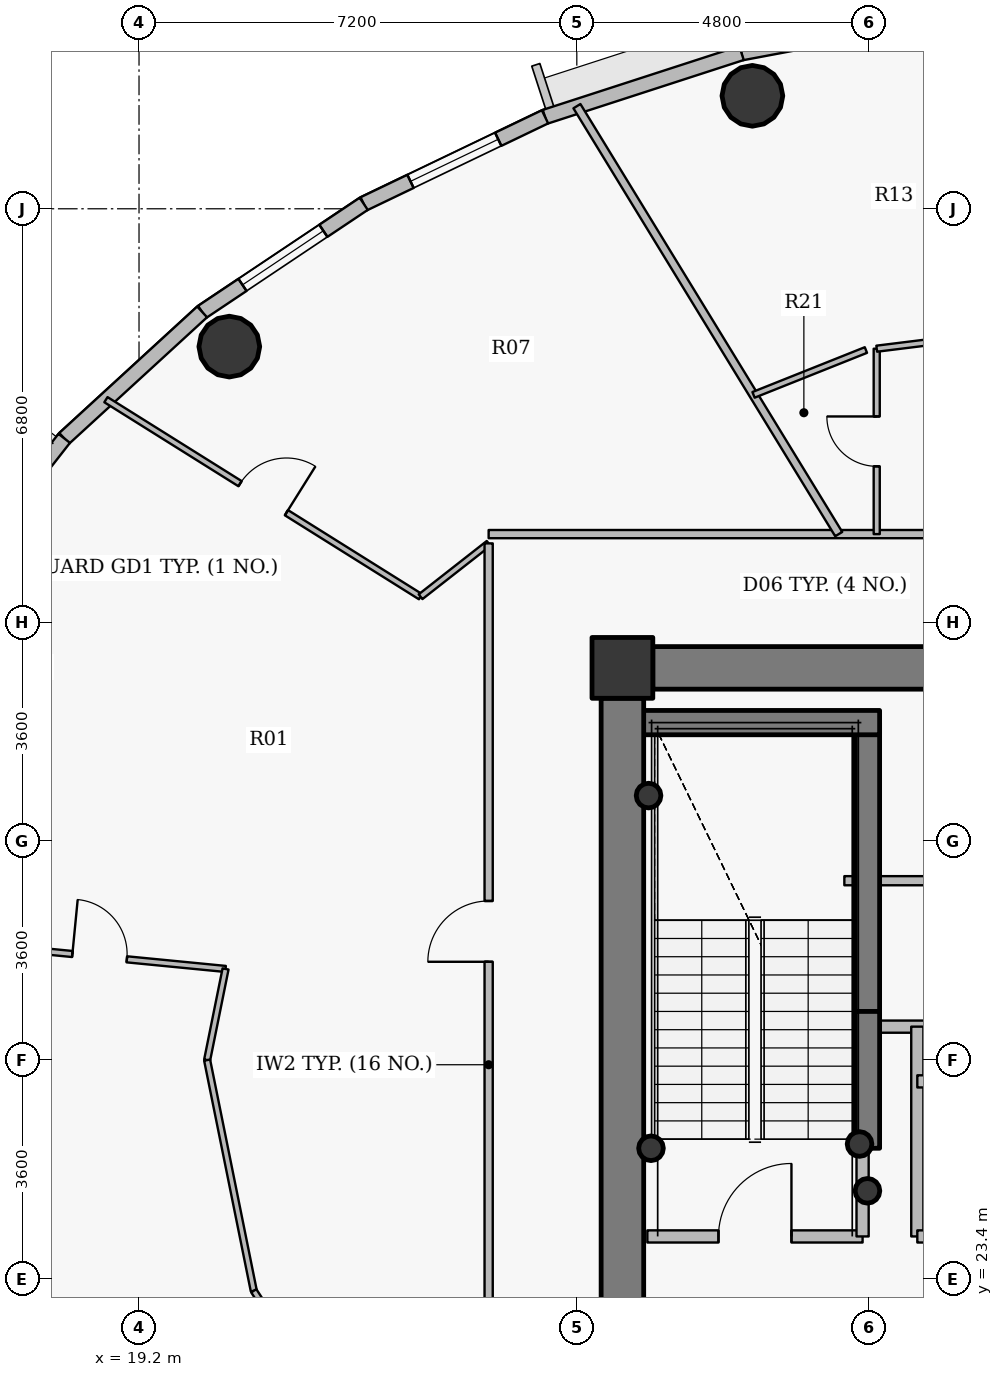
"""IFC4 building model, lengths in metres.
Left out: names, types, materials, properties, quantities, classifications, styles, units other than length and angle.
Written with IfcOpenShell. Run it as: python <this file> out.ifc"""

import sys

from ifc_helpers import new_model, si_unit, direction, frame, frame_2d, origin, origin_2d, place, context, subcontext, project, spatial, rectangle, hollow_circle, extrude, source, transform, mapped, element, fill, save


model = new_model("IFC4")
c1 = context("Model", 3, precision=1e-05, world=origin(), true_north=direction((0.0, 1.0)))
c2 = subcontext(c1, "Body", "Model", "MODEL_VIEW")
j1 = project(units=[si_unit("LENGTHUNIT", "METRE"), si_unit("PLANEANGLEUNIT", "RADIAN")], contexts=[c1])
p1 = place(None, origin())
s1 = spatial("IfcSite", under=j1, at=p1, CompositionType="ELEMENT")
p2 = place(p1, origin())
s2 = spatial("IfcBuilding", under=s1, at=p2, CompositionType="ELEMENT")
p3 = place(p2, frame((0.0, 0.0, 284.25)))
s3 = spatial("IfcBuildingStorey", under=s2, at=p3, CompositionType="ELEMENT", Elevation=284.25)
p4 = place(p3, frame((27.15, 33.45, 0.0), z_axis=(0.0, 0.0, 1.0), x_axis=(1.0, 0.0, 0.0)))
e1 = element("IfcColumn", 1, at=p4, inside=s3, PredefinedType="COLUMN", context=c2, shape_type="SweptSolid", body=[
    extrude(rectangle(XDim=1.0, YDim=1.0, at=origin_2d()), origin(), (0.0, 0.0, 1.0), 3.75),
])
p5 = place(p3, frame((31.18, 27.8, 0.0), z_axis=(0.0, 0.0, 1.0), x_axis=(0.0, 1.0, 0.0)))
e2 = element("IfcWall", 2, at=p5, inside=s3, PredefinedType="SHEAR", context=c2, shape_type="SweptSolid", body=[
    extrude(rectangle(XDim=4.75, YDim=0.4, at=frame_2d((2.375, 0.0))), origin(), (0.0, 0.0, 1.0), 3.75),
])
p6 = place(p3, frame((27.25, 32.55, 0.0), z_axis=(0.0, 0.0, 1.0), x_axis=(1.0, 0.0, 0.0)))
e3 = element("IfcWall", 3, at=p6, inside=s3, PredefinedType="SHEAR", context=c2, shape_type="SweptSolid", body=[
    extrude(rectangle(XDim=4.13, YDim=0.4, at=frame_2d((2.065, 0.0))), origin(), (0.0, 0.0, 1.0), 3.75),
])
for number, where, z_axis, x_axis in (
    (4, (27.58, 31.35, 0.0), (0.0, 0.0, 1.0), (1.0, 0.0, 0.0)),
    (5, (31.05, 25.62, 0.0), (0.0, 0.0, 1.0), (1.0, 0.0, 0.0)),
    (6, (31.18, 24.85, 0.0), (0.0, 0.0, 1.0), (1.0, 0.0, 0.0)),
    (7, (27.62, 25.55, 0.0), (0.0, 0.0, 1.0), (1.0, 0.0, 0.0)),
):
    element("IfcColumn", number, at=place(p3, frame(where, z_axis=z_axis, x_axis=x_axis)), inside=s3, PredefinedType="COLUMN", context=c2, shape_type="SweptSolid", body=[
        extrude(hollow_circle(Radius=0.203, WallThickness=0.016, at=origin_2d()), origin(), (0.0, 0.0, 1.0), 3.75),
    ])
p7 = place(p3, frame((27.65, 33.45, 0.0), z_axis=(0.0, 0.0, 1.0), x_axis=(1.0, 0.0, 0.0)))
e8 = element("IfcWall", 8, at=p7, inside=s3, PredefinedType="SHEAR", context=c2, shape_type="SweptSolid", body=[
    extrude(rectangle(XDim=16.7, YDim=0.7, at=frame_2d((8.35, 0.0))), origin(), (0.0, 0.0, 1.0), 3.05),
])
p8 = place(p7, frame((12.775, 0.0, 0.0)))
e9 = element("IfcOpeningElement", 9, at=p8, cuts=e8, PredefinedType="OPENING", context=c2, shape_type="SweptSolid", body=[
    extrude(rectangle(XDim=1.15, YDim=2.15, at=origin_2d()), frame((0.575, 0.36, 1.075), z_axis=(0.0, -1.0, 0.0), x_axis=(1.0, 0.0, 0.0)), (0.0, 0.0, 1.0), 0.72),
])
p9 = place(p3, frame((27.15, 21.05, 0.0), z_axis=(0.0, 0.0, 1.0), x_axis=(0.0, 1.0, 0.0)))
e10 = element("IfcWall", 10, at=p9, inside=s3, PredefinedType="SHEAR", context=c2, shape_type="SweptSolid", body=[
    extrude(rectangle(XDim=11.9, YDim=0.7, at=frame_2d((5.95, 0.0))), origin(), (0.0, 0.0, 1.0), 3.05),
])
p10 = place(p3, frame((31.18, 25.55, 0.0), z_axis=(0.0, 0.0, 1.0), x_axis=(0.0, 1.0, 0.0)))
e11 = element("IfcWall", 11, at=p10, inside=s3, PredefinedType="SHEAR", context=c2, shape_type="SweptSolid", body=[
    extrude(rectangle(XDim=2.25, YDim=0.4, at=frame_2d((1.125, 0.0))), origin(), (0.0, 0.0, 1.0), 3.1),
])
for number, where, z_axis, x_axis in (
    (12, (29.288, 42.858, 0.0), (0.0, 0.0, 1.0), (1.0, 0.0, 0.0)),
    (13, (20.685, 38.733, 0.0), (0.0, 0.0, 1.0), (1.0, 0.0, 0.0)),
):
    element("IfcColumn", number, at=place(p3, frame(where, z_axis=z_axis, x_axis=x_axis)), inside=s3, PredefinedType="COLUMN", context=c2, shape_type="SweptSolid", body=[
        extrude(hollow_circle(Radius=0.5, WallThickness=0.032, at=origin_2d()), origin(), (0.0, 0.0, 1.0), 3.75),
    ])
p11 = place(p3, frame((29.109, 43.56, 0.0), z_axis=(0.0, 0.0, 1.0), x_axis=(0.982782655757, 0.184765395959, 0.0)))
e14 = element("IfcWall", 14, at=p11, inside=s3, PredefinedType="SOLIDWALL", context=c2, shape_type="SweptSolid", body=[
    extrude(rectangle(XDim=3.462, YDim=0.24, at=frame_2d((1.731, 0.0))), origin(), (0.0, 0.0, 1.0), 3.5),
])
p12 = place(p11, frame((1.106, 0.0, 0.9)))
e15 = element("IfcOpeningElement", 15, at=p12, cuts=e14, PredefinedType="OPENING", context=c2, shape_type="SweptSolid", body=[
    extrude(rectangle(XDim=1.25, YDim=1.65, at=origin_2d()), frame((0.625, 0.13, 0.825), z_axis=(0.0, -1.0, 0.0), x_axis=(1.0, 0.0, 0.0)), (0.0, 0.0, 1.0), 0.26),
])
p13 = place(p3, frame((25.877, 42.512, 0.0), z_axis=(0.0, 0.0, 1.0), x_axis=(0.95123136723, 0.308478339592, 0.0)))
e16 = element("IfcWall", 16, at=p13, inside=s3, PredefinedType="SOLIDWALL", context=c2, shape_type="SweptSolid", body=[
    extrude(rectangle(XDim=3.398, YDim=0.24, at=frame_2d((1.699, 0.0))), origin(), (0.0, 0.0, 1.0), 3.5),
])
p14 = place(p3, frame((22.896, 41.082, 0.0), z_axis=(0.0, 0.0, 1.0), x_axis=(0.901573741254, 0.43262546051, 0.0)))
e17 = element("IfcWall", 17, at=p14, inside=s3, PredefinedType="SOLIDWALL", context=c2, shape_type="SweptSolid", body=[
    extrude(rectangle(XDim=3.307, YDim=0.24, at=frame_2d((1.653, 0.0))), origin(), (0.0, 0.0, 1.0), 3.5),
])
p15 = place(p14, frame((0.854, 0.0, 0.9)))
e18 = element("IfcOpeningElement", 18, at=p15, cuts=e17, PredefinedType="OPENING", context=c2, shape_type="SweptSolid", body=[
    extrude(rectangle(XDim=1.6, YDim=1.75, at=origin_2d()), frame((0.8, 0.13, 0.875), z_axis=(0.0, -1.0, 0.0), x_axis=(1.0, 0.0, 0.0)), (0.0, 0.0, 1.0), 0.26),
])
p16 = place(p3, frame((20.238, 39.304, 0.0), z_axis=(0.0, 0.0, 1.0), x_axis=(0.831250592635, 0.55589787933, 0.0)))
e19 = element("IfcWall", 19, at=p16, inside=s3, PredefinedType="SOLIDWALL", context=c2, shape_type="SweptSolid", body=[
    extrude(rectangle(XDim=3.197, YDim=0.24, at=frame_2d((1.599, 0.0))), origin(), (0.0, 0.0, 1.0), 3.5),
])
p17 = place(p16, frame((0.799, 0.0, 0.9)))
e20 = element("IfcOpeningElement", 20, at=p17, cuts=e19, PredefinedType="OPENING", context=c2, shape_type="SweptSolid", body=[
    extrude(rectangle(XDim=1.6, YDim=1.75, at=origin_2d()), frame((0.8, 0.13, 0.875), z_axis=(0.0, -1.0, 0.0), x_axis=(1.0, 0.0, 0.0)), (0.0, 0.0, 1.0), 0.26),
])
p18 = place(p3, frame((17.97, 37.225, 0.0), z_axis=(0.0, 0.0, 1.0), x_axis=(0.737068506972, 0.675818034703, 0.0)))
e21 = element("IfcWall", 21, at=p18, inside=s3, PredefinedType="SOLIDWALL", context=c2, shape_type="SweptSolid", body=[
    extrude(rectangle(XDim=3.077, YDim=0.24, at=frame_2d((1.539, 0.0))), origin(), (0.0, 0.0, 1.0), 3.5),
])
p19 = place(p3, frame((16.146, 34.895, 0.0), z_axis=(0.0, 0.0, 1.0), x_axis=(0.616337186556, 0.787482363275, 0.0)))
e22 = element("IfcWall", 22, at=p19, inside=s3, PredefinedType="SOLIDWALL", context=c2, shape_type="SweptSolid", body=[
    extrude(rectangle(XDim=2.958, YDim=0.24, at=frame_2d((1.479, 0.0))), origin(), (0.0, 0.0, 1.0), 3.5),
])
p20 = place(p19, frame((0.954, 0.0, 0.0)))
e23 = element("IfcOpeningElement", 23, at=p20, cuts=e22, PredefinedType="OPENING", context=c2, shape_type="SweptSolid", body=[
    extrude(rectangle(XDim=1.05, YDim=2.15, at=origin_2d()), frame((0.525, 0.13, 1.075), z_axis=(0.0, -1.0, 0.0), x_axis=(1.0, 0.0, 0.0)), (0.0, 0.0, 1.0), 0.26),
])
p21 = place(p3, frame((13.936, 29.151, 0.0), z_axis=(0.0, 0.0, 1.0), x_axis=(0.995282339379, -0.097020950936, 0.0)))
e24 = element("IfcWall", 24, at=p21, inside=s3, PredefinedType="PARTITIONING", context=c2, shape_type="SweptSolid", body=[
    extrude(rectangle(XDim=6.719, YDim=0.1, at=frame_2d((3.359, 0.0))), origin(), (0.0, 0.0, 1.0), 2.985),
])
p22 = place(p21, frame((4.188, 0.0, 0.0)))
e25 = element("IfcOpeningElement", 25, at=p22, cuts=e24, PredefinedType="OPENING", context=c2, shape_type="SweptSolid", body=[
    extrude(rectangle(XDim=0.9, YDim=2.1, at=origin_2d()), frame((0.45, 0.06, 1.05), z_axis=(0.0, -1.0, 0.0), x_axis=(1.0, 0.0, 0.0)), (0.0, 0.0, 1.0), 0.12),
])
p23 = place(p3, frame((18.656, 37.861, 0.0), z_axis=(0.0, 0.0, 1.0), x_axis=(0.847553170054, -0.530710489751, 0.0)))
e26 = element("IfcWall", 26, at=p23, inside=s3, PredefinedType="PARTITIONING", context=c2, shape_type="SweptSolid", body=[
    extrude(rectangle(XDim=6.105, YDim=0.1, at=frame_2d((3.052, 0.0))), origin(), (0.0, 0.0, 1.0), 2.985),
])
p24 = place(p23, frame((2.603, 0.0, 0.0)))
e27 = element("IfcOpeningElement", 27, at=p24, cuts=e26, PredefinedType="OPENING", context=c2, shape_type="SweptSolid", body=[
    extrude(rectangle(XDim=0.9, YDim=2.1, at=origin_2d()), frame((0.45, 0.06, 1.05), z_axis=(0.0, -1.0, 0.0), x_axis=(1.0, 0.0, 0.0)), (0.0, 0.0, 1.0), 0.12),
])
p25 = place(p3, frame((20.32, 27.0, 0.0), z_axis=(0.0, 0.0, 1.0), x_axis=(0.198264574188, 0.98014853906, 0.0)))
e28 = element("IfcWall", 28, at=p25, inside=s3, PredefinedType="PARTITIONING", context=c2, shape_type="SweptSolid", body=[
    extrude(rectangle(XDim=1.529, YDim=0.1, at=frame_2d((0.765, 0.0))), origin(), (0.0, 0.0, 1.0), 3.035),
])
p26 = place(p3, frame((20.32, 27.0, 0.0), z_axis=(0.0, 0.0, 1.0), x_axis=(0.198226068862, -0.980156327135, 0.0)))
e29 = element("IfcWall", 29, at=p26, inside=s3, PredefinedType="PARTITIONING", context=c2, shape_type="SweptSolid", body=[
    extrude(rectangle(XDim=3.871, YDim=0.1, at=frame_2d((1.936, 0.0))), origin(), (0.0, 0.0, 1.0), 3.035),
])
p27 = place(p3, frame((21.087, 23.206, 0.0), z_axis=(0.0, 0.0, 1.0), x_axis=(0.545384128846, -0.838186227519, 0.0)))
e30 = element("IfcWall", 30, at=p27, inside=s3, PredefinedType="PARTITIONING", context=c2, shape_type="SweptSolid", body=[
    extrude(rectangle(XDim=1.821, YDim=0.1, at=frame_2d((0.911, 0.0))), origin(), (0.0, 0.0, 1.0), 3.035),
])
p28 = place(p3, frame((23.83, 34.621, 0.0), z_axis=(0.0, 0.0, 1.0), x_axis=(0.787407186809, 0.616433226037, 0.0)))
e31 = element("IfcWall", 31, at=p28, inside=s3, PredefinedType="PARTITIONING", context=c2, shape_type="SweptSolid", body=[
    extrude(rectangle(XDim=1.422, YDim=0.1, at=frame_2d((0.711, 0.0))), origin(), (0.0, 0.0, 1.0), 3.035),
])
p29 = place(p3, frame((24.95, 18.35, 0.0), z_axis=(0.0, 0.0, 1.0), x_axis=(0.0, 1.0, 0.0)))
e32 = element("IfcWall", 32, at=p29, inside=s3, PredefinedType="PARTITIONING", context=c2, shape_type="SweptSolid", body=[
    extrude(rectangle(XDim=17.147, YDim=0.135, at=frame_2d((8.574, 0.0))), origin(), (0.0, 0.0, 1.0), 3.035),
])
p30 = place(p29, frame((10.267, 0.0, 0.0)))
e33 = element("IfcOpeningElement", 33, at=p30, cuts=e32, PredefinedType="OPENING", context=c2, shape_type="SweptSolid", body=[
    extrude(rectangle(XDim=1.0, YDim=2.15, at=origin_2d()), frame((0.5, 0.078, 1.075), z_axis=(0.0, -1.0, 0.0), x_axis=(1.0, 0.0, 0.0)), (0.0, 0.0, 1.0), 0.155),
])
p31 = place(p3, frame((24.95, 35.65, 0.0), z_axis=(0.0, 0.0, 1.0), x_axis=(1.0, 0.0, 0.0)))
e34 = element("IfcWall", 34, at=p31, inside=s3, PredefinedType="PARTITIONING", context=c2, shape_type="SweptSolid", body=[
    extrude(rectangle(XDim=10.1, YDim=0.135, at=frame_2d((5.05, 0.0))), origin(), (0.0, 0.0, 1.0), 3.035),
])
p32 = place(p3, frame((26.402, 42.688, 0.0), z_axis=(0.0, 0.0, 1.0), x_axis=(0.521891606098, -0.853011812043, 0.0)))
e35 = element("IfcWall", 35, at=p32, inside=s3, PredefinedType="PARTITIONING", context=c2, shape_type="SweptSolid", body=[
    extrude(rectangle(XDim=8.25, YDim=0.135, at=frame_2d((4.125, 0.0))), origin(), (0.0, 0.0, 1.0), 2.985),
])
p33 = place(p3, frame((27.56, 24.1, 0.0), z_axis=(0.0, 0.0, 1.0), x_axis=(1.0, 0.0, 0.0)))
e36 = element("IfcWall", 36, at=p33, inside=s3, PredefinedType="PARTITIONING", context=c2, shape_type="SweptSolid", body=[
    extrude(rectangle(XDim=3.54, YDim=0.2, at=frame_2d((1.77, 0.0))), origin(), (0.0, 0.0, 1.0), 3.5),
])
p34 = place(p33, frame((1.17, 0.0, 0.0)))
e37 = element("IfcOpeningElement", 37, at=p34, cuts=e36, PredefinedType="OPENING", context=c2, shape_type="SweptSolid", body=[
    extrude(rectangle(XDim=1.2, YDim=2.15, at=origin_2d()), frame((0.6, 0.11, 1.075), z_axis=(0.0, -1.0, 0.0), x_axis=(1.0, 0.0, 0.0)), (0.0, 0.0, 1.0), 0.22),
])
p35 = place(p3, frame((29.307, 37.94, 0.0), z_axis=(0.0, 0.0, 1.0), x_axis=(0.928797929692, 0.370586569913, 0.0)))
e38 = element("IfcWall", 38, at=p35, inside=s3, PredefinedType="PARTITIONING", context=c2, shape_type="SweptSolid", body=[
    extrude(rectangle(XDim=1.99, YDim=0.1, at=frame_2d((0.995, 0.0))), origin(), (0.0, 0.0, 1.0), 3.035),
])
p36 = place(p3, frame((30.8, 29.95, 0.0), z_axis=(0.0, 0.0, 1.0), x_axis=(1.0, 0.0, 0.0)))
e39 = element("IfcWall", 39, at=p36, inside=s3, PredefinedType="PARTITIONING", context=c2, shape_type="SweptSolid", body=[
    extrude(rectangle(XDim=3.1, YDim=0.15, at=frame_2d((1.55, 0.0))), origin(), (0.0, 0.0, 1.0), 3.085),
])
p37 = place(p3, frame((31.1, 24.1, 0.0), z_axis=(0.0, 0.0, 1.0), x_axis=(0.0, 1.0, 0.0)))
e40 = element("IfcWall", 40, at=p37, inside=s3, PredefinedType="PARTITIONING", context=c2, shape_type="SweptSolid", body=[
    extrude(rectangle(XDim=1.44, YDim=0.2, at=frame_2d((0.72, 0.0))), origin(), (0.0, 0.0, 1.0), 3.5),
])
p38 = place(p3, frame((31.1, 27.55, 0.0), z_axis=(0.0, 0.0, 1.0), x_axis=(1.0, 0.0, 0.0)))
e41 = element("IfcWall", 41, at=p38, inside=s3, PredefinedType="PARTITIONING", context=c2, shape_type="SweptSolid", body=[
    extrude(rectangle(XDim=2.8, YDim=0.2, at=frame_2d((1.4, 0.0))), origin(), (0.0, 0.0, 1.0), 3.085),
])
p39 = place(p38, frame((1.5, 0.0, 0.0)))
e42 = element("IfcOpeningElement", 42, at=p39, cuts=e41, PredefinedType="OPENING", context=c2, shape_type="SweptSolid", body=[
    extrude(rectangle(XDim=0.66, YDim=2.05, at=origin_2d()), frame((0.33, 0.11, 1.025), z_axis=(0.0, -1.0, 0.0), x_axis=(1.0, 0.0, 0.0)), (0.0, 0.0, 1.0), 0.22),
])
p40 = place(p3, frame((31.333, 35.65, 0.0), z_axis=(0.0, 0.0, 1.0), x_axis=(0.0, 1.0, 0.0)))
e43 = element("IfcWall", 43, at=p40, inside=s3, PredefinedType="PARTITIONING", context=c2, shape_type="SweptSolid", body=[
    extrude(rectangle(XDim=3.049, YDim=0.1, at=frame_2d((1.525, 0.0))), origin(), (0.0, 0.0, 1.0), 3.035),
])
p41 = place(p40, frame((1.115, 0.0, 0.0)))
e44 = element("IfcOpeningElement", 44, at=p41, cuts=e43, PredefinedType="OPENING", context=c2, shape_type="SweptSolid", body=[
    extrude(rectangle(XDim=0.82, YDim=2.1, at=origin_2d()), frame((0.41, 0.06, 1.05), z_axis=(0.0, -1.0, 0.0), x_axis=(1.0, 0.0, 0.0)), (0.0, 0.0, 1.0), 0.12),
])
p42 = place(p3, frame((31.333, 38.699, 0.0), z_axis=(0.0, 0.0, 1.0), x_axis=(0.992398193069, 0.123068380965, 0.0)))
e45 = element("IfcWall", 45, at=p42, inside=s3, PredefinedType="PARTITIONING", context=c2, shape_type="SweptSolid", body=[
    extrude(rectangle(XDim=3.638, YDim=0.1, at=frame_2d((1.819, 0.0))), origin(), (0.0, 0.0, 1.0), 3.125),
])
p43 = place(p3, frame((32.0, 24.1, 0.0), z_axis=(0.0, 0.0, 1.0), x_axis=(0.0, 1.0, 0.0)))
e46 = element("IfcWall", 46, at=p43, inside=s3, PredefinedType="PARTITIONING", context=c2, shape_type="SweptSolid", body=[
    extrude(rectangle(XDim=3.45, YDim=0.2, at=frame_2d((1.725, 0.0))), origin(), (0.0, 0.0, 1.0), 3.5),
])
p44 = place(p3, frame((32.0, 24.1, 0.0), z_axis=(0.0, 0.0, 1.0), x_axis=(1.0, 0.0, 0.0)))
e47 = element("IfcWall", 47, at=p44, inside=s3, PredefinedType="PARTITIONING", context=c2, shape_type="SweptSolid", body=[
    extrude(rectangle(XDim=1.9, YDim=0.2, at=frame_2d((0.95, 0.0))), origin(), (0.0, 0.0, 1.0), 3.085),
])
p45 = place(p44, frame((0.375, 0.0, 0.0)))
e48 = element("IfcOpeningElement", 48, at=p45, cuts=e47, PredefinedType="OPENING", context=c2, shape_type="SweptSolid", body=[
    extrude(rectangle(XDim=1.15, YDim=2.15, at=origin_2d()), frame((0.575, 0.11, 1.075), z_axis=(0.0, -1.0, 0.0), x_axis=(1.0, 0.0, 0.0)), (0.0, 0.0, 1.0), 0.22),
])
p46 = place(p3, frame((32.0, 26.65, 0.0), z_axis=(0.0, 0.0, 1.0), x_axis=(1.0, 0.0, 0.0)))
e49 = element("IfcWall", 49, at=p46, inside=s3, PredefinedType="PARTITIONING", context=c2, shape_type="SweptSolid", body=[
    extrude(rectangle(XDim=1.9, YDim=0.2, at=frame_2d((0.95, 0.0))), origin(), (0.0, 0.0, 1.0), 3.085),
])
p47 = place(p3, frame((27.64, 33.8, 0.0), z_axis=(0.0, 0.0, 1.0), x_axis=(-1.0, 0.0, 0.0)))
e50 = element("IfcWall", 50, at=p47, inside=s3, PredefinedType="PARTITIONING", context=c2, shape_type="SweptSolid", body=[
    extrude(rectangle(XDim=0.84, YDim=0.135, at=frame_2d((0.42, 0.0))), origin(), (0.0, 0.0, 1.0), 3.035),
])
p48 = place(p3, frame((26.8, 33.492, 0.0), z_axis=(0.0, 0.0, 1.0), x_axis=(0.0, -1.0, 0.0)))
e51 = element("IfcWall", 51, at=p48, inside=s3, PredefinedType="PARTITIONING", context=c2, shape_type="SweptSolid", body=[
    extrude(rectangle(XDim=0.532, YDim=0.135, at=frame_2d((0.266, 0.0))), origin(), (0.0, 0.0, 1.0), 3.5),
])
m1 = source(origin(), c2, "Body", "SweptSolid", [
    extrude(rectangle(XDim=1.6, YDim=1.75, at=origin_2d()), frame((0.8, 0.03, 0.875), z_axis=(0.0, -1.0, 0.0), x_axis=(1.0, 0.0, 0.0)), (0.0, 0.0, 1.0), 0.06),
])
p49 = place(p15, origin())
e52 = element("IfcWindow", 52, at=p49, inside=s3, PartitioningType="DOUBLE_PANEL_VERTICAL", PredefinedType="WINDOW", context=c2, shape_type="MappedRepresentation", body=[
    mapped(m1, transform((0.0, 0.0, 0.0), x_axis=(1.0, 0.0, 0.0), y_axis=(0.0, 1.0, 0.0), z_axis=(0.0, 0.0, 1.0), scale=1.0)),
])
fill(e18, e52)
p50 = place(p17, origin())
e53 = element("IfcWindow", 53, at=p50, inside=s3, PartitioningType="DOUBLE_PANEL_VERTICAL", PredefinedType="WINDOW", context=c2, shape_type="MappedRepresentation", body=[
    mapped(m1, transform((0.0, 0.0, 0.0), x_axis=(1.0, 0.0, 0.0), y_axis=(0.0, 1.0, 0.0), z_axis=(0.0, 0.0, 1.0), scale=1.0)),
])
fill(e20, e53)
m2 = source(origin(), c2, "Body", "SweptSolid", [
    extrude(rectangle(XDim=1.2, YDim=2.15, at=origin_2d()), frame((0.6, 0.025, 1.075), z_axis=(0.0, -1.0, 0.0), x_axis=(1.0, 0.0, 0.0)), (0.0, 0.0, 1.0), 0.05),
])
p51 = place(p34, origin())
e54 = element("IfcDoor", 54, at=p51, inside=s3, OperationType="SINGLE_SWING_RIGHT", PredefinedType="DOOR", context=c2, shape_type="MappedRepresentation", body=[
    mapped(m2, transform((0.0, 0.0, 0.0), x_axis=(1.0, 0.0, 0.0), y_axis=(0.0, 1.0, 0.0), z_axis=(0.0, 0.0, 1.0), scale=1.0)),
])
fill(e37, e54)
m3 = source(origin(), c2, "Body", "SweptSolid", [
    extrude(rectangle(XDim=0.82, YDim=2.1, at=origin_2d()), frame((0.41, 0.025, 1.05), z_axis=(0.0, -1.0, 0.0), x_axis=(1.0, 0.0, 0.0)), (0.0, 0.0, 1.0), 0.05),
])
p52 = place(p41, origin())
e55 = element("IfcDoor", 55, at=p52, inside=s3, OperationType="SINGLE_SWING_RIGHT", PredefinedType="DOOR", context=c2, shape_type="MappedRepresentation", body=[
    mapped(m3, transform((0.0, 0.0, 0.0), x_axis=(1.0, 0.0, 0.0), y_axis=(0.0, 1.0, 0.0), z_axis=(0.0, 0.0, 1.0), scale=1.0)),
])
fill(e44, e55)
m4 = source(origin(), c2, "Body", "SweptSolid", [
    extrude(rectangle(XDim=1.0, YDim=2.15, at=origin_2d()), frame((0.5, 0.025, 1.075), z_axis=(0.0, -1.0, 0.0), x_axis=(1.0, 0.0, 0.0)), (0.0, 0.0, 1.0), 0.05),
])
p53 = place(p30, origin())
e56 = element("IfcDoor", 56, at=p53, inside=s3, OperationType="SINGLE_SWING_LEFT", PredefinedType="DOOR", context=c2, shape_type="MappedRepresentation", body=[
    mapped(m4, transform((0.0, 0.0, 0.0), x_axis=(1.0, 0.0, 0.0), y_axis=(0.0, 1.0, 0.0), z_axis=(0.0, 0.0, 1.0), scale=1.0)),
])
fill(e33, e56)
m5 = source(origin(), c2, "Body", "SweptSolid", [
    extrude(rectangle(XDim=0.9, YDim=2.1, at=origin_2d()), frame((0.45, 0.025, 1.05), z_axis=(0.0, -1.0, 0.0), x_axis=(1.0, 0.0, 0.0)), (0.0, 0.0, 1.0), 0.05),
])
p54 = place(p24, origin())
e57 = element("IfcDoor", 57, at=p54, inside=s3, OperationType="SINGLE_SWING_RIGHT", PredefinedType="DOOR", context=c2, shape_type="MappedRepresentation", body=[
    mapped(m5, transform((0.0, 0.0, 0.0), x_axis=(1.0, 0.0, 0.0), y_axis=(0.0, 1.0, 0.0), z_axis=(0.0, 0.0, 1.0), scale=1.0)),
])
fill(e27, e57)
p55 = place(p22, origin())
e58 = element("IfcDoor", 58, at=p55, inside=s3, OperationType="SINGLE_SWING_LEFT", PredefinedType="DOOR", context=c2, shape_type="MappedRepresentation", body=[
    mapped(m5, transform((0.0, 0.0, 0.0), x_axis=(1.0, 0.0, 0.0), y_axis=(0.0, 1.0, 0.0), z_axis=(0.0, 0.0, 1.0), scale=1.0)),
])
fill(e25, e58)
save(model, sys.argv[1])
